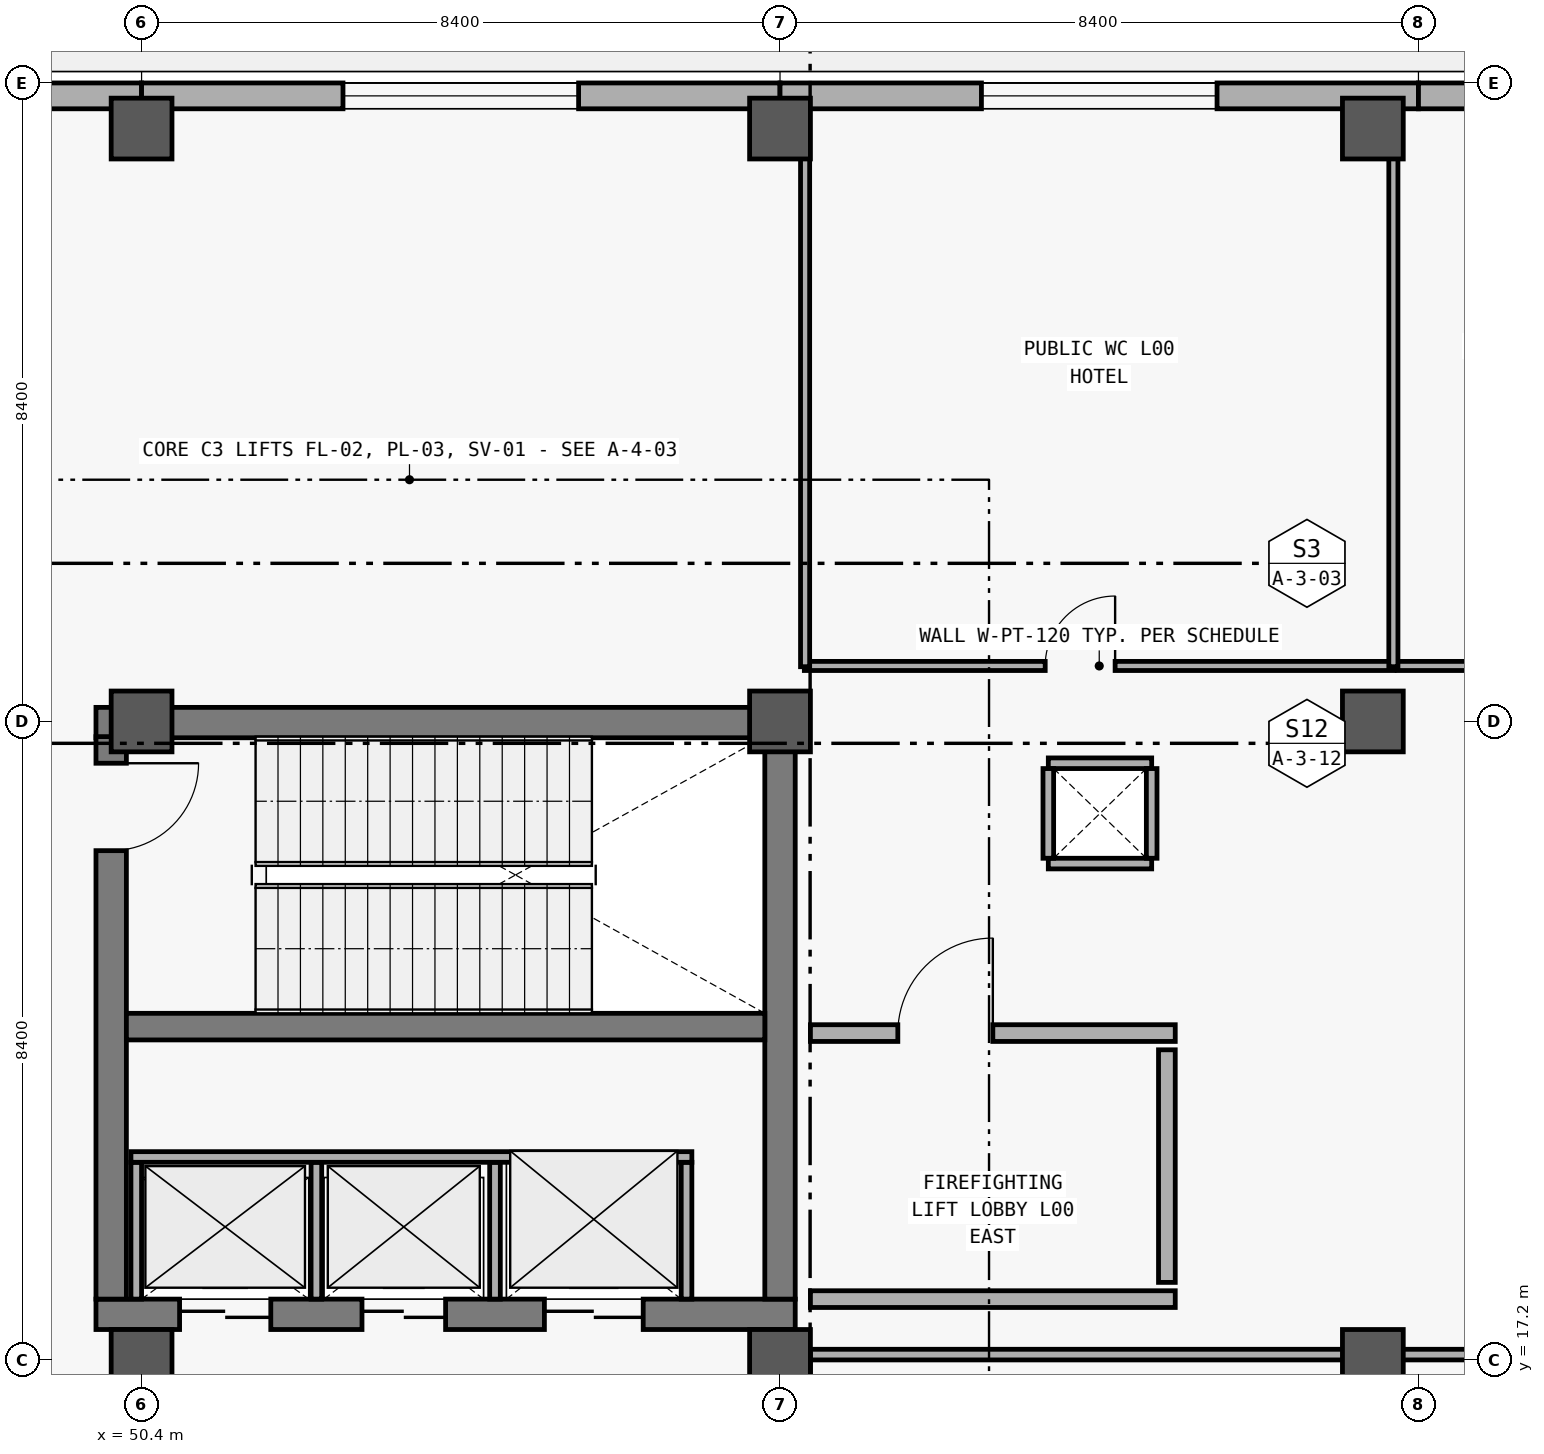
"""IFC4 building model, lengths in metres.
Left out: names, types, materials, properties, quantities, classifications, styles, units other than length and angle.
Written with IfcOpenShell. Run it as: python <this file> out.ifc"""

import sys

from ifc_helpers import new_model, si_unit, direction, frame, frame_2d, origin, origin_2d, place, context, subcontext, project, spatial, rectangle, extrude, element, fill, save


model = new_model("IFC4")
c1 = context("Model", 3, precision=1e-05, world=origin(), true_north=direction((0.0, 1.0)))
c2 = subcontext(c1, "Body", "Model", "MODEL_VIEW")
j1 = project(units=[si_unit("LENGTHUNIT", "METRE"), si_unit("PLANEANGLEUNIT", "RADIAN")], contexts=[c1])
p1 = place(None, origin())
s1 = spatial("IfcSite", under=j1, at=p1, CompositionType="ELEMENT")
p2 = place(p1, origin())
s2 = spatial("IfcBuilding", under=s1, at=p2, CompositionType="ELEMENT")
p3 = place(p2, origin())
s3 = spatial("IfcBuildingStorey", under=s2, at=p3, CompositionType="ELEMENT", Elevation=0.0)
for number, where, z_axis, x_axis in (
    (1, (50.4, 17.2, 0.0), (0.0, 0.0, 1.0), (1.0, 0.0, 0.0)),
    (2, (50.4, 25.6, 0.0), (0.0, 0.0, 1.0), (1.0, 0.0, 0.0)),
    (3, (50.4, 33.4, 0.0), (0.0, 0.0, 1.0), (1.0, 0.0, 0.0)),
    (4, (58.8, 17.2, 0.0), (0.0, 0.0, 1.0), (1.0, 0.0, 0.0)),
    (5, (58.8, 25.6, 0.0), (0.0, 0.0, 1.0), (1.0, 0.0, 0.0)),
    (6, (58.8, 33.4, 0.0), (0.0, 0.0, 1.0), (1.0, 0.0, 0.0)),
    (7, (66.6, 17.2, 0.0), (0.0, 0.0, 1.0), (1.0, 0.0, 0.0)),
    (8, (66.6, 25.6, 0.0), (0.0, 0.0, 1.0), (1.0, 0.0, 0.0)),
    (9, (66.6, 33.4, 0.0), (0.0, 0.0, 1.0), (1.0, 0.0, 0.0)),
):
    element("IfcColumn", number, at=place(p3, frame(where, z_axis=z_axis, x_axis=x_axis)), inside=s3, PredefinedType="COLUMN", context=c2, shape_type="SweptSolid", body=[
        extrude(rectangle(XDim=0.8, YDim=0.8, at=origin_2d()), origin(), (0.0, 0.0, 1.0), 5.4),
    ])
p4 = place(p3, frame((42.0, 33.83, 0.0), z_axis=(0.0, 0.0, 1.0), x_axis=(1.0, 0.0, 0.0)))
e10 = element("IfcWall", 10, at=p4, inside=s3, PredefinedType="SOLIDWALL", context=c2, shape_type="SweptSolid", body=[
    extrude(rectangle(XDim=8.4, YDim=0.34, at=frame_2d((4.2, 0.0))), origin(), (0.0, 0.0, 1.0), 5.1),
])
p5 = place(p4, frame((3.2, 0.0, 0.0)))
e11 = element("IfcOpeningElement", 11, at=p5, cuts=e10, PredefinedType="OPENING", context=c2, shape_type="SweptSolid", body=[
    extrude(rectangle(XDim=2.0, YDim=2.6, at=frame_2d((1.0, 1.3))), frame((0.0, 0.18, 0.0), z_axis=(0.0, -1.0, 0.0), x_axis=(1.0, 0.0, 0.0)), (0.0, 0.0, 1.0), 0.36),
])
p6 = place(p3, frame((50.4, 33.83, 0.0), z_axis=(0.0, 0.0, 1.0), x_axis=(1.0, 0.0, 0.0)))
e12 = element("IfcWall", 12, at=p6, inside=s3, PredefinedType="SOLIDWALL", context=c2, shape_type="SweptSolid", body=[
    extrude(rectangle(XDim=8.4, YDim=0.34, at=frame_2d((4.2, 0.0))), origin(), (0.0, 0.0, 1.0), 5.1),
])
p7 = place(p6, frame((2.65, 0.0, 0.9)))
e13 = element("IfcOpeningElement", 13, at=p7, cuts=e12, PredefinedType="OPENING", context=c2, shape_type="SweptSolid", body=[
    extrude(rectangle(XDim=3.1, YDim=2.2, at=frame_2d((1.55, 1.1))), frame((0.0, 0.18, 0.0), z_axis=(0.0, -1.0, 0.0), x_axis=(1.0, 0.0, 0.0)), (0.0, 0.0, 1.0), 0.36),
])
p8 = place(p3, frame((58.8, 33.83, 0.0), z_axis=(0.0, 0.0, 1.0), x_axis=(1.0, 0.0, 0.0)))
e14 = element("IfcWall", 14, at=p8, inside=s3, PredefinedType="SOLIDWALL", context=c2, shape_type="SweptSolid", body=[
    extrude(rectangle(XDim=8.4, YDim=0.34, at=frame_2d((4.2, 0.0))), origin(), (0.0, 0.0, 1.0), 5.1),
])
p9 = place(p8, frame((2.65, 0.0, 0.9)))
e15 = element("IfcOpeningElement", 15, at=p9, cuts=e14, PredefinedType="OPENING", context=c2, shape_type="SweptSolid", body=[
    extrude(rectangle(XDim=3.1, YDim=2.2, at=frame_2d((1.55, 1.1))), frame((0.0, 0.18, 0.0), z_axis=(0.0, -1.0, 0.0), x_axis=(1.0, 0.0, 0.0)), (0.0, 0.0, 1.0), 0.36),
])
p10 = place(p3, frame((67.2, 33.83, 0.0), z_axis=(0.0, 0.0, 1.0), x_axis=(1.0, 0.0, 0.0)))
e16 = element("IfcWall", 16, at=p10, inside=s3, PredefinedType="SOLIDWALL", context=c2, shape_type="SweptSolid", body=[
    extrude(rectangle(XDim=8.4, YDim=0.34, at=frame_2d((4.2, 0.0))), origin(), (0.0, 0.0, 1.0), 5.1),
])
p11 = place(p10, frame((2.65, 0.0, 0.9)))
e17 = element("IfcOpeningElement", 17, at=p11, cuts=e16, PredefinedType="OPENING", context=c2, shape_type="SweptSolid", body=[
    extrude(rectangle(XDim=3.1, YDim=2.2, at=frame_2d((1.55, 1.1))), frame((0.0, 0.18, 0.0), z_axis=(0.0, -1.0, 0.0), x_axis=(1.0, 0.0, 0.0)), (0.0, 0.0, 1.0), 0.36),
])
p12 = place(p3, frame((49.8, 17.8, 0.0), z_axis=(0.0, 0.0, 1.0), x_axis=(1.0, 0.0, 0.0)))
e18 = element("IfcWall", 18, at=p12, inside=s3, PredefinedType="SHEAR", context=c2, shape_type="SweptSolid", body=[
    extrude(rectangle(XDim=9.2, YDim=0.4, at=frame_2d((4.6, 0.0))), origin(), (0.0, 0.0, 1.0), 5.08),
])
p13 = place(p12, frame((1.1, 0.0, 0.0)))
e19 = element("IfcOpeningElement", 19, at=p13, cuts=e18, PredefinedType="OPENING", context=c2, shape_type="SweptSolid", body=[
    extrude(rectangle(XDim=1.2, YDim=2.2, at=frame_2d((0.6, 1.1))), frame((0.0, 0.21, 0.0), z_axis=(0.0, -1.0, 0.0), x_axis=(1.0, 0.0, 0.0)), (0.0, 0.0, 1.0), 0.42),
])
p14 = place(p12, frame((3.5, 0.0, 0.0)))
e20 = element("IfcOpeningElement", 20, at=p14, cuts=e18, PredefinedType="OPENING", context=c2, shape_type="SweptSolid", body=[
    extrude(rectangle(XDim=1.1, YDim=2.2, at=frame_2d((0.55, 1.1))), frame((0.0, 0.21, 0.0), z_axis=(0.0, -1.0, 0.0), x_axis=(1.0, 0.0, 0.0)), (0.0, 0.0, 1.0), 0.42),
])
p15 = place(p12, frame((5.9, 0.0, 0.0)))
e21 = element("IfcOpeningElement", 21, at=p15, cuts=e18, PredefinedType="OPENING", context=c2, shape_type="SweptSolid", body=[
    extrude(rectangle(XDim=1.3, YDim=2.3, at=frame_2d((0.65, 1.15))), frame((0.0, 0.21, 0.0), z_axis=(0.0, -1.0, 0.0), x_axis=(1.0, 0.0, 0.0)), (0.0, 0.0, 1.0), 0.42),
])
p16 = place(p3, frame((59.0, 25.585, 0.0), z_axis=(0.0, 0.0, 1.0), x_axis=(-1.0, 0.0, 0.0)))
e22 = element("IfcWall", 22, at=p16, inside=s3, PredefinedType="SHEAR", context=c2, shape_type="SweptSolid", body=[
    extrude(rectangle(XDim=9.2, YDim=0.4, at=frame_2d((4.6, 0.0))), origin(), (0.0, 0.0, 1.0), 5.08),
])
p17 = place(p3, frame((50.0, 25.4, 0.0), z_axis=(0.0, 0.0, 1.0), x_axis=(0.0, -1.0, 0.0)))
e23 = element("IfcWall", 23, at=p17, inside=s3, PredefinedType="SHEAR", context=c2, shape_type="SweptSolid", body=[
    extrude(rectangle(XDim=7.4, YDim=0.4, at=frame_2d((3.7, 0.0))), origin(), (0.0, 0.0, 1.0), 5.08),
])
p18 = place(p17, frame((0.35, 0.0, 0.0)))
e24 = element("IfcOpeningElement", 24, at=p18, cuts=e23, PredefinedType="OPENING", context=c2, shape_type="SweptSolid", body=[
    extrude(rectangle(XDim=1.15, YDim=2.2, at=frame_2d((0.575, 1.1))), frame((0.0, 0.21, 0.0), z_axis=(0.0, -1.0, 0.0), x_axis=(1.0, 0.0, 0.0)), (0.0, 0.0, 1.0), 0.42),
])
p19 = place(p3, frame((58.8, 18.0, 0.0), z_axis=(0.0, 0.0, 1.0), x_axis=(0.0, 1.0, 0.0)))
e25 = element("IfcWall", 25, at=p19, inside=s3, PredefinedType="SHEAR", context=c2, shape_type="SweptSolid", body=[
    extrude(rectangle(XDim=7.4, YDim=0.4, at=frame_2d((3.7, 0.0))), origin(), (0.0, 0.0, 1.0), 5.08),
])
p20 = place(p3, frame((50.2, 21.585, 0.0), z_axis=(0.0, 0.0, 1.0), x_axis=(1.0, 0.0, 0.0)))
e26 = element("IfcWall", 26, at=p20, inside=s3, PredefinedType="SHEAR", context=c2, shape_type="SweptSolid", body=[
    extrude(rectangle(XDim=8.4, YDim=0.35, at=frame_2d((4.2, 0.0))), origin(), (0.0, 0.0, 1.0), 5.08),
])
for number, where, z_axis, x_axis in (
    (27, (50.33, 18.0, 0.0), (0.0, 0.0, 1.0), (0.0, 1.0, 0.0)),
    (28, (52.7, 18.0, 0.0), (0.0, 0.0, 1.0), (0.0, 1.0, 0.0)),
    (29, (55.05, 18.0, 0.0), (0.0, 0.0, 1.0), (0.0, 1.0, 0.0)),
    (30, (57.57, 18.0, 0.0), (0.0, 0.0, 1.0), (0.0, 1.0, 0.0)),
):
    element("IfcWall", number, at=place(p3, frame(where, z_axis=z_axis, x_axis=x_axis)), inside=s3, PredefinedType="PARTITIONING", context=c2, shape_type="SweptSolid", body=[
        extrude(rectangle(XDim=1.8, YDim=0.14, at=frame_2d((0.9, 0.0))), origin(), (0.0, 0.0, 1.0), 4.23),
    ])
p21 = place(p3, frame((50.26, 19.87, 0.0), z_axis=(0.0, 0.0, 1.0), x_axis=(1.0, 0.0, 0.0)))
e31 = element("IfcWall", 31, at=p21, inside=s3, PredefinedType="PARTITIONING", context=c2, shape_type="SweptSolid", body=[
    extrude(rectangle(XDim=7.38, YDim=0.14, at=frame_2d((3.69, 0.0))), origin(), (0.0, 0.0, 1.0), 4.23),
])
p22 = place(p3, frame((59.2, 18.0, 0.0), z_axis=(0.0, 0.0, 1.0), x_axis=(1.0, 0.0, 0.0)))
e32 = element("IfcWall", 32, at=p22, inside=s3, PredefinedType="SOLIDWALL", context=c2, shape_type="SweptSolid", body=[
    extrude(rectangle(XDim=4.8, YDim=0.22, at=frame_2d((2.4, 0.0))), origin(), (0.0, 0.0, 1.0), 4.23),
])
p23 = place(p3, frame((59.2, 21.5, 0.0), z_axis=(0.0, 0.0, 1.0), x_axis=(1.0, 0.0, 0.0)))
e33 = element("IfcWall", 33, at=p23, inside=s3, PredefinedType="SOLIDWALL", context=c2, shape_type="SweptSolid", body=[
    extrude(rectangle(XDim=4.8, YDim=0.22, at=frame_2d((2.4, 0.0))), origin(), (0.0, 0.0, 1.0), 4.23),
])
p24 = place(p23, frame((1.15, 0.0, 0.0)))
e34 = element("IfcOpeningElement", 34, at=p24, cuts=e33, PredefinedType="OPENING", context=c2, shape_type="SweptSolid", body=[
    extrude(rectangle(XDim=1.25, YDim=2.2, at=frame_2d((0.625, 1.1))), frame((0.0, 0.12, 0.0), z_axis=(0.0, -1.0, 0.0), x_axis=(1.0, 0.0, 0.0)), (0.0, 0.0, 1.0), 0.24),
])
p25 = place(p3, frame((63.89, 18.22, 0.0), z_axis=(0.0, 0.0, 1.0), x_axis=(0.0, 1.0, 0.0)))
e35 = element("IfcWall", 35, at=p25, inside=s3, PredefinedType="SOLIDWALL", context=c2, shape_type="SweptSolid", body=[
    extrude(rectangle(XDim=3.06, YDim=0.22, at=frame_2d((1.53, 0.0))), origin(), (0.0, 0.0, 1.0), 4.23),
])
p26 = place(p3, frame((59.12, 26.33, 0.0), z_axis=(0.0, 0.0, 1.0), x_axis=(1.0, 0.0, 0.0)))
e36 = element("IfcWall", 36, at=p26, inside=s3, PredefinedType="PARTITIONING", context=c2, shape_type="SweptSolid", body=[
    extrude(rectangle(XDim=7.76, YDim=0.12, at=frame_2d((3.88, 0.0))), origin(), (0.0, 0.0, 1.0), 4.18),
])
p27 = place(p26, frame((3.169, 0.0, 0.0)))
e37 = element("IfcOpeningElement", 37, at=p27, cuts=e36, PredefinedType="OPENING", context=c2, shape_type="SweptSolid", body=[
    extrude(rectangle(XDim=0.92, YDim=2.15, at=frame_2d((0.46, 1.075))), frame((0.0, 0.07, 0.0), z_axis=(0.0, -1.0, 0.0), x_axis=(1.0, 0.0, 0.0)), (0.0, 0.0, 1.0), 0.14),
])
p28 = place(p3, frame((66.92, 26.33, 0.0), z_axis=(0.0, 0.0, 1.0), x_axis=(1.0, 0.0, 0.0)))
e38 = element("IfcWall", 38, at=p28, inside=s3, PredefinedType="PARTITIONING", context=c2, shape_type="SweptSolid", body=[
    extrude(rectangle(XDim=3.76, YDim=0.12, at=frame_2d((1.88, 0.0))), origin(), (0.0, 0.0, 1.0), 4.18),
])
p29 = place(p28, frame((2.04, 0.0, 0.0)))
e39 = element("IfcOpeningElement", 39, at=p29, cuts=e38, PredefinedType="OPENING", context=c2, shape_type="SweptSolid", body=[
    extrude(rectangle(XDim=1.04, YDim=2.15, at=frame_2d((0.52, 1.075))), frame((0.0, 0.07, 0.0), z_axis=(0.0, -1.0, 0.0), x_axis=(1.0, 0.0, 0.0)), (0.0, 0.0, 1.0), 0.14),
])
p30 = place(p3, frame((59.12, 17.27, 0.0), z_axis=(0.0, 0.0, 1.0), x_axis=(1.0, 0.0, 0.0)))
e40 = element("IfcWall", 40, at=p30, inside=s3, PredefinedType="PARTITIONING", context=c2, shape_type="SweptSolid", body=[
    extrude(rectangle(XDim=16.06, YDim=0.14, at=frame_2d((8.03, 0.0))), origin(), (0.0, 0.0, 1.0), 4.18),
])
p31 = place(p30, frame((11.2, 0.0, 0.0)))
e41 = element("IfcOpeningElement", 41, at=p31, cuts=e40, PredefinedType="OPENING", context=c2, shape_type="SweptSolid", body=[
    extrude(rectangle(XDim=1.08, YDim=2.25, at=frame_2d((0.54, 1.125))), frame((0.0, 0.08, 0.0), z_axis=(0.0, -1.0, 0.0), x_axis=(1.0, 0.0, 0.0)), (0.0, 0.0, 1.0), 0.16),
])
for number, where, z_axis, x_axis in (
    (42, (59.13, 26.32, 0.0), (0.0, 0.0, 1.0), (0.0, 1.0, 0.0)),
    (43, (66.87, 26.32, 0.0), (0.0, 0.0, 1.0), (0.0, 1.0, 0.0)),
):
    element("IfcWall", number, at=place(p3, frame(where, z_axis=z_axis, x_axis=x_axis)), inside=s3, PredefinedType="PARTITIONING", context=c2, shape_type="SweptSolid", body=[
        extrude(rectangle(XDim=7.34, YDim=0.12, at=frame_2d((3.67, 0.0))), origin(), (0.0, 0.0, 1.0), 4.18),
    ])
p32 = place(p3, frame((59.13, 6.34, 0.0), z_axis=(0.0, 0.0, 1.0), x_axis=(0.0, 1.0, 0.0)))
e44 = element("IfcWall", 44, at=p32, inside=s3, PredefinedType="PARTITIONING", context=c2, shape_type="SweptSolid", body=[
    extrude(rectangle(XDim=10.94, YDim=0.14, at=frame_2d((5.47, 0.0))), origin(), (0.0, 0.0, 1.0), 4.18),
])
for number, where, z_axis, x_axis in (
    (45, (62.33, 23.73, 0.0), (0.0, 0.0, 1.0), (1.0, 0.0, 0.0)),
    (46, (63.69, 25.05, 0.0), (0.0, 0.0, 1.0), (-1.0, 0.0, 0.0)),
):
    element("IfcWall", number, at=place(p3, frame(where, z_axis=z_axis, x_axis=x_axis)), inside=s3, PredefinedType="PARTITIONING", context=c2, shape_type="SweptSolid", body=[
        extrude(rectangle(XDim=1.36, YDim=0.14, at=frame_2d((0.68, 0.0))), origin(), (0.0, 0.0, 1.0), 4.2),
    ])
for number, where, z_axis, x_axis in (
    (47, (62.33, 24.98, 0.0), (0.0, 0.0, 1.0), (0.0, -1.0, 0.0)),
    (48, (63.69, 23.8, 0.0), (0.0, 0.0, 1.0), (0.0, 1.0, 0.0)),
):
    element("IfcWall", number, at=place(p3, frame(where, z_axis=z_axis, x_axis=x_axis)), inside=s3, PredefinedType="PARTITIONING", context=c2, shape_type="SweptSolid", body=[
        extrude(rectangle(XDim=1.18, YDim=0.14, at=frame_2d((0.59, 0.0))), origin(), (0.0, 0.0, 1.0), 4.2),
    ])
p33 = place(p7, origin())
e49 = element("IfcWindow", 49, at=p33, inside=s3, PartitioningType="SINGLE_PANEL", PredefinedType="WINDOW", context=c2, shape_type="SweptSolid", body=[
    extrude(rectangle(XDim=3.1, YDim=2.2, at=frame_2d((1.55, 1.1))), frame((0.0, 0.03, 0.0), z_axis=(0.0, -1.0, 0.0), x_axis=(1.0, 0.0, 0.0)), (0.0, 0.0, 1.0), 0.06),
])
fill(e13, e49)
p34 = place(p9, origin())
e50 = element("IfcWindow", 50, at=p34, inside=s3, PartitioningType="SINGLE_PANEL", PredefinedType="WINDOW", context=c2, shape_type="SweptSolid", body=[
    extrude(rectangle(XDim=3.1, YDim=2.2, at=frame_2d((1.55, 1.1))), frame((0.0, 0.03, 0.0), z_axis=(0.0, -1.0, 0.0), x_axis=(1.0, 0.0, 0.0)), (0.0, 0.0, 1.0), 0.06),
])
fill(e15, e50)
p35 = place(p18, origin())
e51 = element("IfcDoor", 51, at=p35, inside=s3, OperationType="SINGLE_SWING_LEFT", PredefinedType="DOOR", context=c2, shape_type="SweptSolid", body=[
    extrude(rectangle(XDim=1.15, YDim=2.2, at=frame_2d((0.575, 1.1))), frame((0.0, 0.025, 0.0), z_axis=(0.0, -1.0, 0.0), x_axis=(1.0, 0.0, 0.0)), (0.0, 0.0, 1.0), 0.05),
])
fill(e24, e51)
p36 = place(p13, origin())
e52 = element("IfcDoor", 52, at=p36, inside=s3, OperationType="DOUBLE_DOOR_SLIDING", PredefinedType="DOOR", context=c2, shape_type="SweptSolid", body=[
    extrude(rectangle(XDim=1.2, YDim=2.2, at=frame_2d((0.6, 1.1))), frame((0.0, 0.025, 0.0), z_axis=(0.0, -1.0, 0.0), x_axis=(1.0, 0.0, 0.0)), (0.0, 0.0, 1.0), 0.05),
])
fill(e19, e52)
p37 = place(p14, origin())
e53 = element("IfcDoor", 53, at=p37, inside=s3, OperationType="DOUBLE_DOOR_SLIDING", PredefinedType="DOOR", context=c2, shape_type="SweptSolid", body=[
    extrude(rectangle(XDim=1.1, YDim=2.2, at=frame_2d((0.55, 1.1))), frame((0.0, 0.025, 0.0), z_axis=(0.0, -1.0, 0.0), x_axis=(1.0, 0.0, 0.0)), (0.0, 0.0, 1.0), 0.05),
])
fill(e20, e53)
p38 = place(p15, origin())
e54 = element("IfcDoor", 54, at=p38, inside=s3, OperationType="DOUBLE_DOOR_SLIDING", PredefinedType="DOOR", context=c2, shape_type="SweptSolid", body=[
    extrude(rectangle(XDim=1.3, YDim=2.3, at=frame_2d((0.65, 1.15))), frame((0.0, 0.025, 0.0), z_axis=(0.0, -1.0, 0.0), x_axis=(1.0, 0.0, 0.0)), (0.0, 0.0, 1.0), 0.05),
])
fill(e21, e54)
p39 = place(p24, origin())
e55 = element("IfcDoor", 55, at=p39, inside=s3, OperationType="SINGLE_SWING_RIGHT", PredefinedType="DOOR", context=c2, shape_type="SweptSolid", body=[
    extrude(rectangle(XDim=1.25, YDim=2.2, at=frame_2d((0.625, 1.1))), frame((0.0, 0.025, 0.0), z_axis=(0.0, -1.0, 0.0), x_axis=(1.0, 0.0, 0.0)), (0.0, 0.0, 1.0), 0.05),
])
fill(e34, e55)
p40 = place(p27, origin())
e56 = element("IfcDoor", 56, at=p40, inside=s3, OperationType="SINGLE_SWING_RIGHT", PredefinedType="DOOR", context=c2, shape_type="SweptSolid", body=[
    extrude(rectangle(XDim=0.92, YDim=2.15, at=frame_2d((0.46, 1.075))), frame((0.0, 0.025, 0.0), z_axis=(0.0, -1.0, 0.0), x_axis=(1.0, 0.0, 0.0)), (0.0, 0.0, 1.0), 0.05),
])
fill(e37, e56)
save(model, sys.argv[1])
